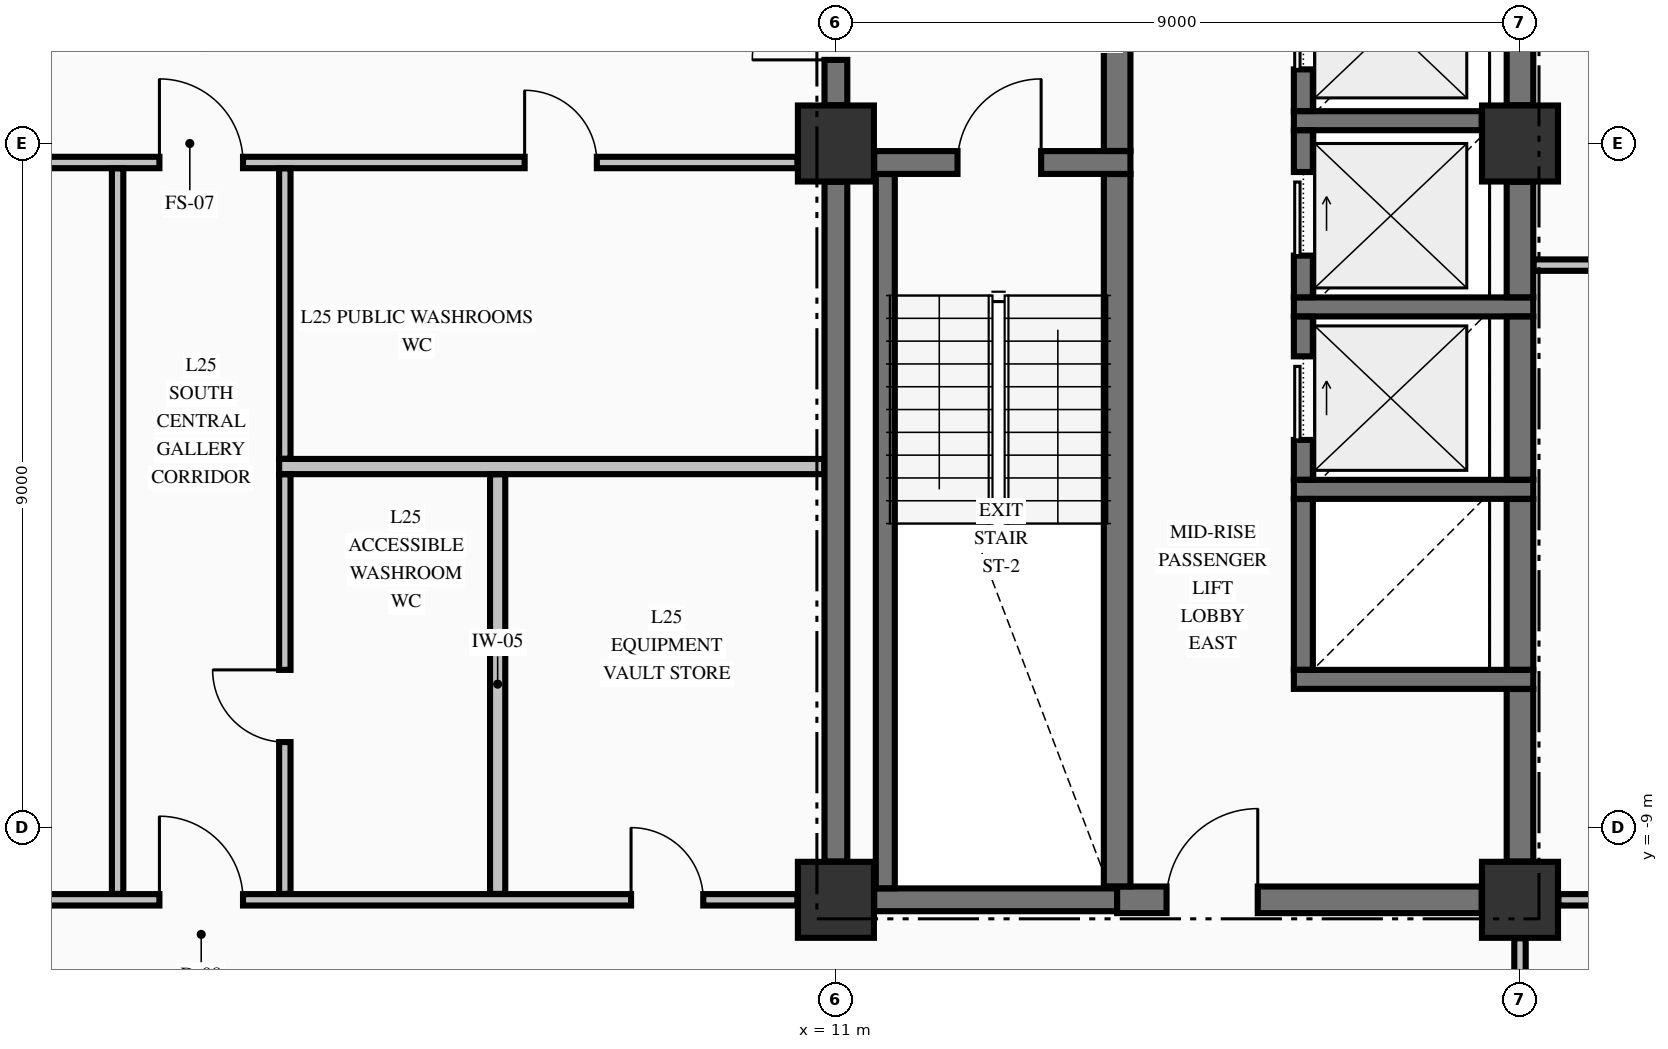
"""IFC4 building model, lengths in metres.
Left out: names, types, materials, properties, quantities, classifications, styles, units other than length and angle.
Written with IfcOpenShell. Run it as: python <this file> out.ifc"""

import sys

from ifc_helpers import new_model, si_unit, direction, frame, frame_2d, origin, origin_2d, place, context, subcontext, project, spatial, rectangle, extrude, element, fill, save


model = new_model("IFC4")
c1 = context("Model", 3, precision=1e-05, world=origin(), true_north=direction((0.0, 1.0)))
c2 = subcontext(c1, "Body", "Model", "MODEL_VIEW")
j1 = project(units=[si_unit("LENGTHUNIT", "METRE"), si_unit("PLANEANGLEUNIT", "RADIAN")], contexts=[c1])
p1 = place(None, origin())
s1 = spatial("IfcSite", under=j1, at=p1, CompositionType="ELEMENT")
p2 = place(p1, origin())
s2 = spatial("IfcBuilding", under=s1, at=p2, CompositionType="ELEMENT")
p3 = place(p2, frame((0.0, 0.0, 102.07)))
s3 = spatial("IfcBuildingStorey", under=s2, at=p3, CompositionType="ELEMENT", Elevation=102.07)
for number, where, z_axis, x_axis in (
    (1, (11.0, -9.95, -0.25), (0.0, 0.0, 1.0), (1.0, 0.0, 0.0)),
    (2, (11.0, 0.0, -0.25), (0.0, 0.0, 1.0), (1.0, 0.0, 0.0)),
    (3, (20.0, -9.95, -0.25), (0.0, 0.0, 1.0), (1.0, 0.0, 0.0)),
    (4, (20.0, 0.0, -0.25), (0.0, 0.0, 1.0), (1.0, 0.0, 0.0)),
):
    element("IfcColumn", number, at=place(p3, frame(where, z_axis=z_axis, x_axis=x_axis)), inside=s3, PredefinedType="COLUMN", context=c2, shape_type="SweptSolid", body=[
        extrude(rectangle(XDim=1.0, YDim=1.0, at=origin_2d()), origin(), (0.0, 0.0, 1.0), 3.57),
    ])
p4 = place(p3, frame((11.504, -9.95, 0.0), z_axis=(0.0, 0.0, 1.0), x_axis=(1.0, 0.0, 0.0)))
e5 = element("IfcWall", 5, at=p4, inside=s3, PredefinedType="SHEAR", context=c2, shape_type="SweptSolid", body=[
    extrude(rectangle(XDim=3.196, YDim=0.3, at=frame_2d((1.598, 0.0))), origin(), (0.0, 0.0, 1.0), 3.32),
])
p5 = place(p3, frame((14.7, -9.95, 0.0), z_axis=(0.0, 0.0, 1.0), x_axis=(1.0, 0.0, 0.0)))
e6 = element("IfcWall", 6, at=p5, inside=s3, PredefinedType="SHEAR", context=c2, shape_type="SweptSolid", body=[
    extrude(rectangle(XDim=4.796, YDim=0.35, at=frame_2d((2.398, 0.0))), origin(), (0.0, 0.0, 1.0), 3.32),
])
p6 = place(p5, frame((0.65, 0.0, 0.0)))
e7 = element("IfcOpeningElement", 7, at=p6, cuts=e6, PredefinedType="OPENING", context=c2, shape_type="SweptSolid", body=[
    extrude(rectangle(XDim=1.2, YDim=2.15, at=frame_2d((0.6, 1.075))), frame((0.0, 0.185, 0.0), z_axis=(0.0, -1.0, 0.0), x_axis=(1.0, 0.0, 0.0)), (0.0, 0.0, 1.0), 0.37),
])
for number, where, z_axis, x_axis in (
    (8, (17.025, -7.05, 0.0), (0.0, 0.0, 1.0), (1.0, 0.0, 0.0)),
    (9, (17.025, -4.55, 0.0), (0.0, 0.0, 1.0), (1.0, 0.0, 0.0)),
    (10, (17.025, -2.15, 0.0), (0.0, 0.0, 1.0), (1.0, 0.0, 0.0)),
):
    element("IfcWall", number, at=place(p3, frame(where, z_axis=z_axis, x_axis=x_axis)), inside=s3, PredefinedType="SOLIDWALL", context=c2, shape_type="SweptSolid", body=[
        extrude(rectangle(XDim=3.15, YDim=0.25, at=frame_2d((1.575, 0.0))), origin(), (0.0, 0.0, 1.0), 3.32),
    ])
p7 = place(p3, frame((11.504, -0.25, 0.0), z_axis=(0.0, 0.0, 1.0), x_axis=(1.0, 0.0, 0.0)))
e11 = element("IfcWall", 11, at=p7, inside=s3, PredefinedType="SHEAR", context=c2, shape_type="SweptSolid", body=[
    extrude(rectangle(XDim=3.371, YDim=0.3, at=frame_2d((1.686, 0.0))), origin(), (0.0, 0.0, 1.0), 3.32),
])
p8 = place(p7, frame((1.096, 0.0, 0.0)))
e12 = element("IfcOpeningElement", 12, at=p8, cuts=e11, PredefinedType="OPENING", context=c2, shape_type="SweptSolid", body=[
    extrude(rectangle(XDim=1.1, YDim=2.15, at=frame_2d((0.55, 1.075))), frame((0.0, 0.16, 0.0), z_axis=(0.0, -1.0, 0.0), x_axis=(1.0, 0.0, 0.0)), (0.0, 0.0, 1.0), 0.32),
])
p9 = place(p3, frame((17.025, 0.3, 0.0), z_axis=(0.0, 0.0, 1.0), x_axis=(1.0, 0.0, 0.0)))
e13 = element("IfcWall", 13, at=p9, inside=s3, PredefinedType="SOLIDWALL", context=c2, shape_type="SweptSolid", body=[
    extrude(rectangle(XDim=2.471, YDim=0.25, at=frame_2d((1.236, 0.0))), origin(), (0.0, 0.0, 1.0), 3.32),
])
p10 = place(p3, frame((-10.494, -9.95, 0.0), z_axis=(0.0, 0.0, 1.0), x_axis=(1.0, 0.0, 0.0)))
e14 = element("IfcWall", 14, at=p10, inside=s3, PredefinedType="PARTITIONING", context=c2, shape_type="SweptSolid", body=[
    extrude(rectangle(XDim=20.988, YDim=0.15, at=frame_2d((10.494, 0.0))), origin(), (0.0, 0.0, 1.0), 3.32),
])
p11 = place(p10, frame((12.594, 0.0, 0.0)))
e15 = element("IfcOpeningElement", 15, at=p11, cuts=e14, PredefinedType="OPENING", context=c2, shape_type="SweptSolid", body=[
    extrude(rectangle(XDim=1.1, YDim=2.15, at=frame_2d((0.55, 1.075))), frame((0.0, 0.085, 0.0), z_axis=(0.0, -1.0, 0.0), x_axis=(1.0, 0.0, 0.0)), (0.0, 0.0, 1.0), 0.17),
])
p12 = place(p10, frame((18.799, 0.0, 0.0)))
e16 = element("IfcOpeningElement", 16, at=p12, cuts=e14, PredefinedType="OPENING", context=c2, shape_type="SweptSolid", body=[
    extrude(rectangle(XDim=0.95, YDim=2.15, at=frame_2d((0.475, 1.075))), frame((0.0, 0.085, 0.0), z_axis=(0.0, -1.0, 0.0), x_axis=(1.0, 0.0, 0.0)), (0.0, 0.0, 1.0), 0.17),
])
p13 = place(p3, frame((20.506, -9.95, 0.0), z_axis=(0.0, 0.0, 1.0), x_axis=(1.0, 0.0, 0.0)))
e17 = element("IfcWall", 17, at=p13, inside=s3, PredefinedType="PARTITIONING", context=c2, shape_type="SweptSolid", body=[
    extrude(rectangle(XDim=7.329, YDim=0.15, at=frame_2d((3.665, 0.0))), origin(), (0.0, 0.0, 1.0), 3.32),
])
p14 = place(p13, frame((3.019, 0.0, 0.0)))
e18 = element("IfcOpeningElement", 18, at=p14, cuts=e17, PredefinedType="OPENING", context=c2, shape_type="SweptSolid", body=[
    extrude(rectangle(XDim=0.95, YDim=2.15, at=frame_2d((0.475, 1.075))), frame((0.0, 0.085, 0.0), z_axis=(0.0, -1.0, 0.0), x_axis=(1.0, 0.0, 0.0)), (0.0, 0.0, 1.0), 0.17),
])
p15 = place(p3, frame((3.675, -4.25, 0.0), z_axis=(0.0, 0.0, 1.0), x_axis=(1.0, 0.0, 0.0)))
e19 = element("IfcWall", 19, at=p15, inside=s3, PredefinedType="PARTITIONING", context=c2, shape_type="SweptSolid", body=[
    extrude(rectangle(XDim=7.172, YDim=0.2, at=frame_2d((3.586, 0.0))), origin(), (0.0, 0.0, 1.0), 3.32),
])
p16 = place(p3, frame((20.178, -1.6, 0.0), z_axis=(0.0, 0.0, 1.0), x_axis=(1.0, 0.0, 0.0)))
e20 = element("IfcWall", 20, at=p16, inside=s3, PredefinedType="PARTITIONING", context=c2, shape_type="SweptSolid", body=[
    extrude(rectangle(XDim=7.657, YDim=0.15, at=frame_2d((3.829, 0.0))), origin(), (0.0, 0.0, 1.0), 3.32),
])
p17 = place(p3, frame((-10.494, -0.25, 0.0), z_axis=(0.0, 0.0, 1.0), x_axis=(1.0, 0.0, 0.0)))
e21 = element("IfcWall", 21, at=p17, inside=s3, PredefinedType="PARTITIONING", context=c2, shape_type="SweptSolid", body=[
    extrude(rectangle(XDim=20.988, YDim=0.15, at=frame_2d((10.494, 0.0))), origin(), (0.0, 0.0, 1.0), 3.32),
])
p18 = place(p17, frame((12.594, 0.0, 0.0)))
e22 = element("IfcOpeningElement", 22, at=p18, cuts=e21, PredefinedType="OPENING", context=c2, shape_type="SweptSolid", body=[
    extrude(rectangle(XDim=1.1, YDim=2.15, at=frame_2d((0.55, 1.075))), frame((0.0, 0.085, 0.0), z_axis=(0.0, -1.0, 0.0), x_axis=(1.0, 0.0, 0.0)), (0.0, 0.0, 1.0), 0.17),
])
p19 = place(p17, frame((5.249, 0.0, 0.0)))
e23 = element("IfcOpeningElement", 23, at=p19, cuts=e21, PredefinedType="OPENING", context=c2, shape_type="SweptSolid", body=[
    extrude(rectangle(XDim=1.05, YDim=2.15, at=frame_2d((0.525, 1.075))), frame((0.0, 0.085, 0.0), z_axis=(0.0, -1.0, 0.0), x_axis=(1.0, 0.0, 0.0)), (0.0, 0.0, 1.0), 0.17),
])
p20 = place(p17, frame((17.399, 0.0, 0.0)))
e24 = element("IfcOpeningElement", 24, at=p20, cuts=e21, PredefinedType="OPENING", context=c2, shape_type="SweptSolid", body=[
    extrude(rectangle(XDim=0.95, YDim=2.15, at=frame_2d((0.475, 1.075))), frame((0.0, 0.085, 0.0), z_axis=(0.0, -1.0, 0.0), x_axis=(1.0, 0.0, 0.0)), (0.0, 0.0, 1.0), 0.17),
])
p21 = place(p3, frame((11.0, -9.446, 0.0), z_axis=(0.0, 0.0, 1.0), x_axis=(0.0, 1.0, 0.0)))
e25 = element("IfcWall", 25, at=p21, inside=s3, PredefinedType="SHEAR", context=c2, shape_type="SweptSolid", body=[
    extrude(rectangle(XDim=8.942, YDim=0.3, at=frame_2d((4.471, 0.0))), origin(), (0.0, 0.0, 1.0), 3.32),
])
p22 = place(p3, frame((11.0, 0.504, 0.0), z_axis=(0.0, 0.0, 1.0), x_axis=(0.0, 1.0, 0.0)))
e26 = element("IfcWall", 26, at=p22, inside=s3, PredefinedType="SHEAR", context=c2, shape_type="SweptSolid", body=[
    extrude(rectangle(XDim=2.244, YDim=0.3, at=frame_2d((1.122, 0.0))), origin(), (0.0, 0.0, 1.0), 3.32),
])
p23 = place(p22, frame((0.596, 0.0, 0.0)))
e27 = element("IfcOpeningElement", 27, at=p23, cuts=e26, PredefinedType="OPENING", context=c2, shape_type="SweptSolid", body=[
    extrude(rectangle(XDim=1.1, YDim=2.15, at=frame_2d((0.55, 1.075))), frame((0.0, 0.16, 0.0), z_axis=(0.0, -1.0, 0.0), x_axis=(1.0, 0.0, 0.0)), (0.0, 0.0, 1.0), 0.32),
])
p24 = place(p3, frame((11.65, -9.798, 0.0), z_axis=(0.0, 0.0, 1.0), x_axis=(0.0, 1.0, 0.0)))
e28 = element("IfcWall", 28, at=p24, inside=s3, PredefinedType="SOLIDWALL", context=c2, shape_type="SweptSolid", body=[
    extrude(rectangle(XDim=9.396, YDim=0.25, at=frame_2d((4.698, 0.0))), origin(), (0.0, 0.0, 1.0), 3.32),
])
p25 = place(p3, frame((14.7, -9.773, 0.0), z_axis=(0.0, 0.0, 1.0), x_axis=(0.0, 1.0, 0.0)))
e29 = element("IfcWall", 29, at=p25, inside=s3, PredefinedType="SHEAR", context=c2, shape_type="SweptSolid", body=[
    extrude(rectangle(XDim=9.371, YDim=0.35, at=frame_2d((4.686, 0.0))), origin(), (0.0, 0.0, 1.0), 3.32),
])
p26 = place(p3, frame((14.7, -0.098, 0.0), z_axis=(0.0, 0.0, 1.0), x_axis=(0.0, 1.0, 0.0)))
e30 = element("IfcWall", 30, at=p26, inside=s3, PredefinedType="SHEAR", context=c2, shape_type="SweptSolid", body=[
    extrude(rectangle(XDim=2.846, YDim=0.35, at=frame_2d((1.423, 0.0))), origin(), (0.0, 0.0, 1.0), 3.32),
])
p27 = place(p3, frame((17.15, -6.923, 0.0), z_axis=(0.0, 0.0, 1.0), x_axis=(0.0, 1.0, 0.0)))
e31 = element("IfcWall", 31, at=p27, inside=s3, PredefinedType="SOLIDWALL", context=c2, shape_type="SweptSolid", body=[
    extrude(rectangle(XDim=2.246, YDim=0.25, at=frame_2d((1.123, 0.0))), origin(), (0.0, 0.0, 1.0), 3.32),
])
p28 = place(p3, frame((17.15, -4.423, 0.0), z_axis=(0.0, 0.0, 1.0), x_axis=(0.0, 1.0, 0.0)))
e32 = element("IfcWall", 32, at=p28, inside=s3, PredefinedType="SOLIDWALL", context=c2, shape_type="SweptSolid", body=[
    extrude(rectangle(XDim=2.146, YDim=0.25, at=frame_2d((1.073, 0.0))), origin(), (0.0, 0.0, 1.0), 3.32),
])
p29 = place(p28, frame((0.523, 0.0, 0.0)))
e33 = element("IfcOpeningElement", 33, at=p29, cuts=e32, PredefinedType="OPENING", context=c2, shape_type="SweptSolid", body=[
    extrude(rectangle(XDim=1.1, YDim=2.2, at=frame_2d((0.55, 1.1))), frame((0.0, 0.135, 0.0), z_axis=(0.0, -1.0, 0.0), x_axis=(1.0, 0.0, 0.0)), (0.0, 0.0, 1.0), 0.27),
])
p30 = place(p3, frame((17.15, -2.023, 0.0), z_axis=(0.0, 0.0, 1.0), x_axis=(0.0, 1.0, 0.0)))
e34 = element("IfcWall", 34, at=p30, inside=s3, PredefinedType="SOLIDWALL", context=c2, shape_type="SweptSolid", body=[
    extrude(rectangle(XDim=2.196, YDim=0.25, at=frame_2d((1.098, 0.0))), origin(), (0.0, 0.0, 1.0), 3.32),
])
p31 = place(p30, frame((0.548, 0.0, 0.0)))
e35 = element("IfcOpeningElement", 35, at=p31, cuts=e34, PredefinedType="OPENING", context=c2, shape_type="SweptSolid", body=[
    extrude(rectangle(XDim=1.1, YDim=2.2, at=frame_2d((0.55, 1.1))), frame((0.0, 0.135, 0.0), z_axis=(0.0, -1.0, 0.0), x_axis=(1.0, 0.0, 0.0)), (0.0, 0.0, 1.0), 0.27),
])
p32 = place(p3, frame((17.15, 0.427, 0.0), z_axis=(0.0, 0.0, 1.0), x_axis=(0.0, 1.0, 0.0)))
e36 = element("IfcWall", 36, at=p32, inside=s3, PredefinedType="SOLIDWALL", context=c2, shape_type="SweptSolid", body=[
    extrude(rectangle(XDim=2.196, YDim=0.25, at=frame_2d((1.098, 0.0))), origin(), (0.0, 0.0, 1.0), 3.32),
])
p33 = place(p32, frame((0.548, 0.0, 0.0)))
e37 = element("IfcOpeningElement", 37, at=p33, cuts=e36, PredefinedType="OPENING", context=c2, shape_type="SweptSolid", body=[
    extrude(rectangle(XDim=1.1, YDim=2.2, at=frame_2d((0.55, 1.1))), frame((0.0, 0.135, 0.0), z_axis=(0.0, -1.0, 0.0), x_axis=(1.0, 0.0, 0.0)), (0.0, 0.0, 1.0), 0.27),
])
p34 = place(p3, frame((20.0, -9.446, 0.0), z_axis=(0.0, 0.0, 1.0), x_axis=(0.0, 1.0, 0.0)))
e38 = element("IfcWall", 38, at=p34, inside=s3, PredefinedType="SHEAR", context=c2, shape_type="SweptSolid", body=[
    extrude(rectangle(XDim=2.269, YDim=0.35, at=frame_2d((1.135, 0.0))), origin(), (0.0, 0.0, 1.0), 3.32),
])
p35 = place(p3, frame((20.0, -6.923, 0.0), z_axis=(0.0, 0.0, 1.0), x_axis=(0.0, 1.0, 0.0)))
e39 = element("IfcWall", 39, at=p35, inside=s3, PredefinedType="SHEAR", context=c2, shape_type="SweptSolid", body=[
    extrude(rectangle(XDim=2.246, YDim=0.35, at=frame_2d((1.123, 0.0))), origin(), (0.0, 0.0, 1.0), 3.32),
])
p36 = place(p3, frame((20.0, -4.423, 0.0), z_axis=(0.0, 0.0, 1.0), x_axis=(0.0, 1.0, 0.0)))
e40 = element("IfcWall", 40, at=p36, inside=s3, PredefinedType="SHEAR", context=c2, shape_type="SweptSolid", body=[
    extrude(rectangle(XDim=2.146, YDim=0.35, at=frame_2d((1.073, 0.0))), origin(), (0.0, 0.0, 1.0), 3.32),
])
p37 = place(p3, frame((20.0, -2.023, 0.0), z_axis=(0.0, 0.0, 1.0), x_axis=(0.0, 1.0, 0.0)))
e41 = element("IfcWall", 41, at=p37, inside=s3, PredefinedType="SHEAR", context=c2, shape_type="SweptSolid", body=[
    extrude(rectangle(XDim=1.519, YDim=0.35, at=frame_2d((0.76, 0.0))), origin(), (0.0, 0.0, 1.0), 3.32),
])
p38 = place(p3, frame((20.0, 0.504, 0.0), z_axis=(0.0, 0.0, 1.0), x_axis=(0.0, 1.0, 0.0)))
e42 = element("IfcWall", 42, at=p38, inside=s3, PredefinedType="SHEAR", context=c2, shape_type="SweptSolid", body=[
    extrude(rectangle(XDim=2.119, YDim=0.35, at=frame_2d((1.06, 0.0))), origin(), (0.0, 0.0, 1.0), 3.32),
])
p39 = place(p3, frame((1.55, -9.872, 0.0), z_axis=(0.0, 0.0, 1.0), x_axis=(0.0, 1.0, 0.0)))
e43 = element("IfcWall", 43, at=p39, inside=s3, PredefinedType="PARTITIONING", context=c2, shape_type="SweptSolid", body=[
    extrude(rectangle(XDim=9.544, YDim=0.15, at=frame_2d((4.772, 0.0))), origin(), (0.0, 0.0, 1.0), 3.32),
])
p40 = place(p3, frame((3.75, -9.872, 0.0), z_axis=(0.0, 0.0, 1.0), x_axis=(0.0, 1.0, 0.0)))
e44 = element("IfcWall", 44, at=p40, inside=s3, PredefinedType="PARTITIONING", context=c2, shape_type="SweptSolid", body=[
    extrude(rectangle(XDim=5.519, YDim=0.15, at=frame_2d((2.76, 0.0))), origin(), (0.0, 0.0, 1.0), 3.32),
])
p41 = place(p40, frame((1.997, 0.0, 0.0)))
e45 = element("IfcOpeningElement", 45, at=p41, cuts=e44, PredefinedType="OPENING", context=c2, shape_type="SweptSolid", body=[
    extrude(rectangle(XDim=0.95, YDim=2.15, at=frame_2d((0.475, 1.075))), frame((0.0, 0.085, 0.0), z_axis=(0.0, -1.0, 0.0), x_axis=(1.0, 0.0, 0.0)), (0.0, 0.0, 1.0), 0.17),
])
p42 = place(p3, frame((3.75, -4.147, 0.0), z_axis=(0.0, 0.0, 1.0), x_axis=(0.0, 1.0, 0.0)))
e46 = element("IfcWall", 46, at=p42, inside=s3, PredefinedType="PARTITIONING", context=c2, shape_type="SweptSolid", body=[
    extrude(rectangle(XDim=3.819, YDim=0.15, at=frame_2d((1.91, 0.0))), origin(), (0.0, 0.0, 1.0), 3.32),
])
p43 = place(p3, frame((6.55, -9.872, 0.0), z_axis=(0.0, 0.0, 1.0), x_axis=(0.0, 1.0, 0.0)))
e47 = element("IfcWall", 47, at=p43, inside=s3, PredefinedType="PARTITIONING", context=c2, shape_type="SweptSolid", body=[
    extrude(rectangle(XDim=5.519, YDim=0.2, at=frame_2d((2.76, 0.0))), origin(), (0.0, 0.0, 1.0), 3.32),
])
p44 = place(p3, frame((20.0, -13.022, 0.0), z_axis=(0.0, 0.0, 1.0), x_axis=(0.0, 1.0, 0.0)))
e48 = element("IfcWall", 48, at=p44, inside=s3, PredefinedType="PARTITIONING", context=c2, shape_type="SweptSolid", body=[
    extrude(rectangle(XDim=2.566, YDim=0.15, at=frame_2d((1.283, 0.0))), origin(), (0.0, 0.0, 1.0), 2.81),
])
p45 = place(p44, frame((1.027, 0.0, 0.0)))
e49 = element("IfcOpeningElement", 49, at=p45, cuts=e48, PredefinedType="OPENING", context=c2, shape_type="SweptSolid", body=[
    extrude(rectangle(XDim=0.95, YDim=2.15, at=frame_2d((0.475, 1.075))), frame((0.0, 0.085, 0.0), z_axis=(0.0, -1.0, 0.0), x_axis=(1.0, 0.0, 0.0)), (0.0, 0.0, 1.0), 0.17),
])
p46 = place(p8, origin())
e50 = element("IfcDoor", 50, at=p46, inside=s3, OperationType="SINGLE_SWING_RIGHT", PredefinedType="DOOR", context=c2, shape_type="SweptSolid", body=[
    extrude(rectangle(XDim=1.1, YDim=2.15, at=frame_2d((0.55, 1.075))), frame((0.0, 0.025, 0.0), z_axis=(0.0, -1.0, 0.0), x_axis=(1.0, 0.0, 0.0)), (0.0, 0.0, 1.0), 0.05),
])
fill(e12, e50)
p47 = place(p23, origin())
e51 = element("IfcDoor", 51, at=p47, inside=s3, OperationType="SINGLE_SWING_LEFT", PredefinedType="DOOR", context=c2, shape_type="SweptSolid", body=[
    extrude(rectangle(XDim=1.1, YDim=2.15, at=frame_2d((0.55, 1.075))), frame((0.0, 0.025, 0.0), z_axis=(0.0, -1.0, 0.0), x_axis=(1.0, 0.0, 0.0)), (0.0, 0.0, 1.0), 0.05),
])
fill(e27, e51)
p48 = place(p29, origin())
e52 = element("IfcDoor", 52, at=p48, inside=s3, OperationType="SLIDING_TO_RIGHT", PredefinedType="DOOR", context=c2, shape_type="SweptSolid", body=[
    extrude(rectangle(XDim=1.1, YDim=2.2, at=frame_2d((0.55, 1.1))), frame((0.0, 0.025, 0.0), z_axis=(0.0, -1.0, 0.0), x_axis=(1.0, 0.0, 0.0)), (0.0, 0.0, 1.0), 0.05),
])
fill(e33, e52)
p49 = place(p31, origin())
e53 = element("IfcDoor", 53, at=p49, inside=s3, OperationType="SLIDING_TO_RIGHT", PredefinedType="DOOR", context=c2, shape_type="SweptSolid", body=[
    extrude(rectangle(XDim=1.1, YDim=2.2, at=frame_2d((0.55, 1.1))), frame((0.0, 0.025, 0.0), z_axis=(0.0, -1.0, 0.0), x_axis=(1.0, 0.0, 0.0)), (0.0, 0.0, 1.0), 0.05),
])
fill(e35, e53)
p50 = place(p33, origin())
e54 = element("IfcDoor", 54, at=p50, inside=s3, OperationType="SLIDING_TO_RIGHT", PredefinedType="DOOR", context=c2, shape_type="SweptSolid", body=[
    extrude(rectangle(XDim=1.1, YDim=2.2, at=frame_2d((0.55, 1.1))), frame((0.0, 0.025, 0.0), z_axis=(0.0, -1.0, 0.0), x_axis=(1.0, 0.0, 0.0)), (0.0, 0.0, 1.0), 0.05),
])
fill(e37, e54)
p51 = place(p6, origin())
e55 = element("IfcDoor", 55, at=p51, inside=s3, OperationType="SINGLE_SWING_RIGHT", PredefinedType="DOOR", context=c2, shape_type="SweptSolid", body=[
    extrude(rectangle(XDim=1.2, YDim=2.15, at=frame_2d((0.6, 1.075))), frame((0.0, 0.025, 0.0), z_axis=(0.0, -1.0, 0.0), x_axis=(1.0, 0.0, 0.0)), (0.0, 0.0, 1.0), 0.05),
])
fill(e7, e55)
p52 = place(p11, origin())
e56 = element("IfcDoor", 56, at=p52, inside=s3, OperationType="SINGLE_SWING_LEFT", PredefinedType="DOOR", context=c2, shape_type="SweptSolid", body=[
    extrude(rectangle(XDim=1.1, YDim=2.15, at=frame_2d((0.55, 1.075))), frame((0.0, 0.025, 0.0), z_axis=(0.0, -1.0, 0.0), x_axis=(1.0, 0.0, 0.0)), (0.0, 0.0, 1.0), 0.05),
])
fill(e15, e56)
p53 = place(p18, origin())
e57 = element("IfcDoor", 57, at=p53, inside=s3, OperationType="SINGLE_SWING_LEFT", PredefinedType="DOOR", context=c2, shape_type="SweptSolid", body=[
    extrude(rectangle(XDim=1.1, YDim=2.15, at=frame_2d((0.55, 1.075))), frame((0.0, 0.025, 0.0), z_axis=(0.0, -1.0, 0.0), x_axis=(1.0, 0.0, 0.0)), (0.0, 0.0, 1.0), 0.05),
])
fill(e22, e57)
p54 = place(p20, origin())
e58 = element("IfcDoor", 58, at=p54, inside=s3, OperationType="SINGLE_SWING_LEFT", PredefinedType="DOOR", context=c2, shape_type="SweptSolid", body=[
    extrude(rectangle(XDim=0.95, YDim=2.15, at=frame_2d((0.475, 1.075))), frame((0.0, 0.025, 0.0), z_axis=(0.0, -1.0, 0.0), x_axis=(1.0, 0.0, 0.0)), (0.0, 0.0, 1.0), 0.05),
])
fill(e24, e58)
p55 = place(p41, origin())
e59 = element("IfcDoor", 59, at=p55, inside=s3, OperationType="SINGLE_SWING_RIGHT", PredefinedType="DOOR", context=c2, shape_type="SweptSolid", body=[
    extrude(rectangle(XDim=0.95, YDim=2.15, at=frame_2d((0.475, 1.075))), frame((0.0, 0.025, 0.0), z_axis=(0.0, -1.0, 0.0), x_axis=(1.0, 0.0, 0.0)), (0.0, 0.0, 1.0), 0.05),
])
fill(e45, e59)
p56 = place(p12, origin())
e60 = element("IfcDoor", 60, at=p56, inside=s3, OperationType="SINGLE_SWING_LEFT", PredefinedType="DOOR", context=c2, shape_type="SweptSolid", body=[
    extrude(rectangle(XDim=0.95, YDim=2.15, at=frame_2d((0.475, 1.075))), frame((0.0, 0.025, 0.0), z_axis=(0.0, -1.0, 0.0), x_axis=(1.0, 0.0, 0.0)), (0.0, 0.0, 1.0), 0.05),
])
fill(e16, e60)
save(model, sys.argv[1])
